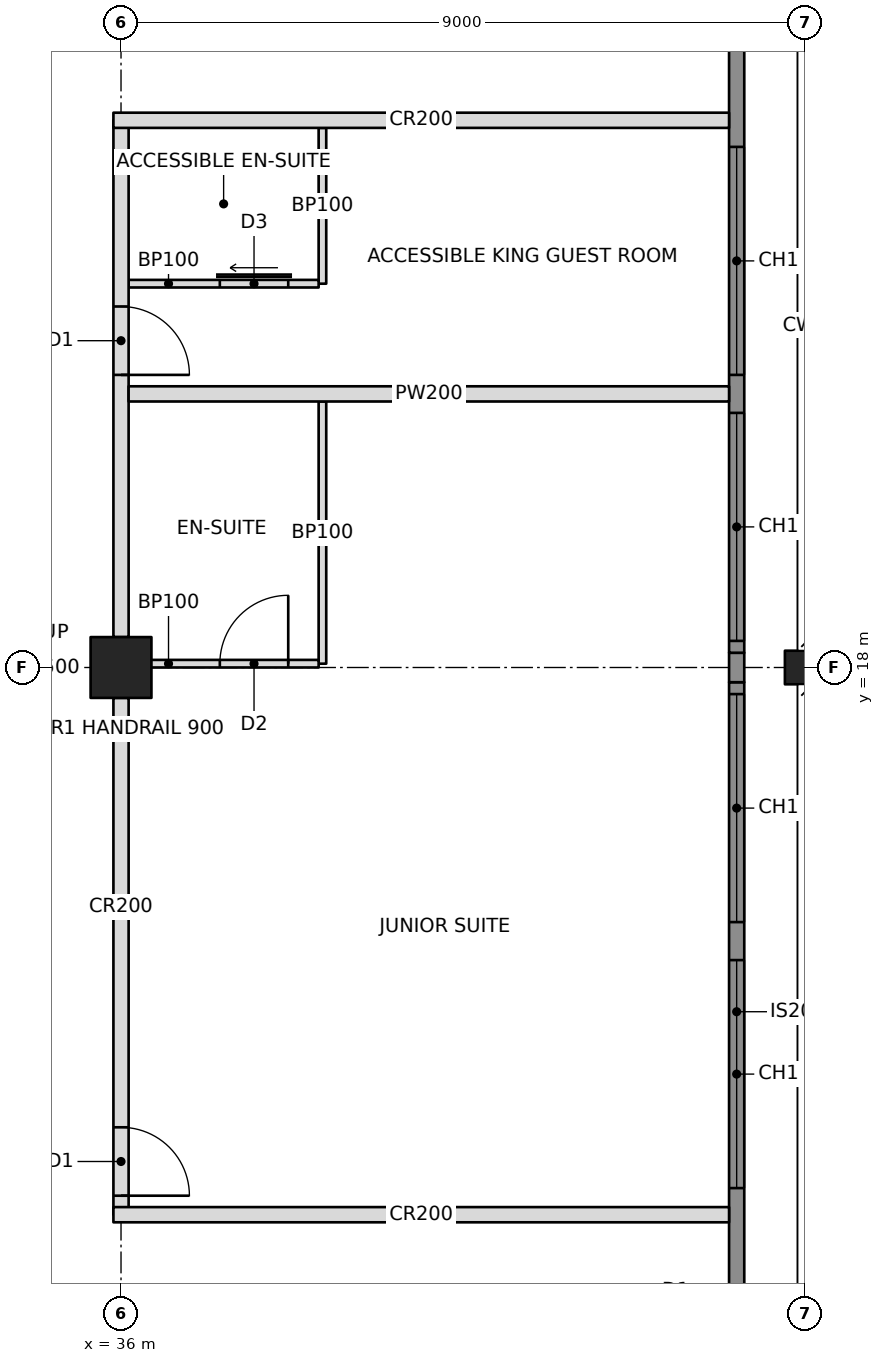
"""IFC4 building model, lengths in metres.
Left out: names, types, materials, properties, quantities, classifications, styles, units other than length and angle.
Written with IfcOpenShell. Run it as: python <this file> out.ifc"""

import sys

from ifc_helpers import new_model, si_unit, direction, frame, frame_2d, origin, origin_2d, place, context, subcontext, project, spatial, rectangle, hollow_rectangle, i_section, extrude, element, fill, save


model = new_model("IFC4")
c1 = context("Model", 3, precision=1e-05, world=origin(), true_north=direction((0.0, 1.0)))
c2 = subcontext(c1, "Body", "Model", "MODEL_VIEW")
j1 = project(units=[si_unit("LENGTHUNIT", "METRE"), si_unit("PLANEANGLEUNIT", "RADIAN")], contexts=[c1])
p1 = place(None, origin())
s1 = spatial("IfcSite", under=j1, at=p1, CompositionType="ELEMENT")
p2 = place(p1, origin())
s2 = spatial("IfcBuilding", under=s1, at=p2, CompositionType="ELEMENT")
p3 = place(p2, frame((0.0, 0.0, 148.6)))
s3 = spatial("IfcBuildingStorey", under=s2, at=p3, CompositionType="ELEMENT", Elevation=148.6)
p4 = place(p3, frame((36.0, 18.0, 0.0), z_axis=(0.0, 0.0, 1.0), x_axis=(0.0, 1.0, 0.0)))
e1 = element("IfcColumn", 1, at=p4, inside=s3, PredefinedType="COLUMN", context=c2, shape_type="SweptSolid", body=[
    extrude(hollow_rectangle(XDim=0.8, YDim=0.8, WallThickness=0.07, at=origin_2d()), origin(), (0.0, 0.0, 1.0), 3.4),
])
p5 = place(p3, frame((45.0, 18.0, 0.0), z_axis=(0.0, 0.0, 1.0), x_axis=(0.0, 1.0, 0.0)))
e2 = element("IfcColumn", 2, at=p5, inside=s3, PredefinedType="COLUMN", context=c2, shape_type="SweptSolid", body=[
    extrude(i_section(OverallWidth=0.442, OverallDepth=0.531, WebThickness=0.066, FlangeThickness=0.106, at=origin_2d()), origin(), (0.0, 0.0, 1.0), 3.4),
])
p6 = place(p3, frame((36.0, 10.8, 0.0), z_axis=(0.0, 0.0, 1.0), x_axis=(0.0, 1.0, 0.0)))
e3 = element("IfcWall", 3, at=p6, inside=s3, PredefinedType="PARTITIONING", context=c2, shape_type="SweptSolid", body=[
    extrude(rectangle(XDim=6.8, YDim=0.2, at=frame_2d((3.4, 0.0))), origin(), (0.0, 0.0, 1.0), 2.405),
])
p7 = place(p6, frame((0.25, 0.0, 0.0)))
e4 = element("IfcOpeningElement", 4, at=p7, cuts=e3, PredefinedType="OPENING", context=c2, shape_type="SweptSolid", body=[
    extrude(rectangle(XDim=0.9, YDim=2.1, at=frame_2d((0.45, 1.05))), frame((0.0, 0.11, 0.0), z_axis=(0.0, -1.0, 0.0), x_axis=(1.0, 0.0, 0.0)), (0.0, 0.0, 1.0), 0.22),
])
p8 = place(p3, frame((36.0, 18.4, 0.0), z_axis=(0.0, 0.0, 1.0), x_axis=(0.0, 1.0, 0.0)))
e5 = element("IfcWall", 5, at=p8, inside=s3, PredefinedType="PARTITIONING", context=c2, shape_type="SweptSolid", body=[
    extrude(rectangle(XDim=6.8, YDim=0.2, at=frame_2d((3.4, 0.0))), origin(), (0.0, 0.0, 1.0), 2.405),
])
p9 = place(p8, frame((3.45, 0.0, 0.0)))
e6 = element("IfcOpeningElement", 6, at=p9, cuts=e5, PredefinedType="OPENING", context=c2, shape_type="SweptSolid", body=[
    extrude(rectangle(XDim=0.9, YDim=2.1, at=frame_2d((0.45, 1.05))), frame((0.0, 0.11, 0.0), z_axis=(0.0, -1.0, 0.0), x_axis=(1.0, 0.0, 0.0)), (0.0, 0.0, 1.0), 0.22),
])
for number, where, z_axis, x_axis in (
    (7, (35.9, 10.8, 0.0), (0.0, 0.0, 1.0), (1.0, 0.0, 0.0)),
    (8, (35.9, 25.2, 0.0), (0.0, 0.0, 1.0), (1.0, 0.0, 0.0)),
):
    element("IfcWall", number, at=place(p3, frame(where, z_axis=z_axis, x_axis=x_axis)), inside=s3, PredefinedType="PARTITIONING", context=c2, shape_type="SweptSolid", body=[
        extrude(rectangle(XDim=8.1, YDim=0.2, at=frame_2d((4.05, 0.0))), origin(), (0.0, 0.0, 1.0), 2.404),
    ])
p10 = place(p3, frame((36.1, 21.6, 0.0), z_axis=(0.0, 0.0, 1.0), x_axis=(1.0, 0.0, 0.0)))
e9 = element("IfcWall", 9, at=p10, inside=s3, PredefinedType="PARTITIONING", context=c2, shape_type="SweptSolid", body=[
    extrude(rectangle(XDim=7.9, YDim=0.2, at=frame_2d((3.95, 0.0))), origin(), (0.0, 0.0, 1.0), 2.404),
])
p11 = place(p3, frame((38.65, 18.05, 0.0), z_axis=(0.0, 0.0, 1.0), x_axis=(0.0, 1.0, 0.0)))
e10 = element("IfcWall", 10, at=p11, inside=s3, PredefinedType="PARTITIONING", context=c2, shape_type="SweptSolid", body=[
    extrude(rectangle(XDim=3.45, YDim=0.1, at=frame_2d((1.725, 0.0))), origin(), (0.0, 0.0, 1.0), 2.404),
])
p12 = place(p3, frame((36.1, 18.05, 0.0), z_axis=(0.0, 0.0, 1.0), x_axis=(1.0, 0.0, 0.0)))
e11 = element("IfcWall", 11, at=p12, inside=s3, PredefinedType="PARTITIONING", context=c2, shape_type="SweptSolid", body=[
    extrude(rectangle(XDim=2.5, YDim=0.1, at=frame_2d((1.25, 0.0))), origin(), (0.0, 0.0, 1.0), 2.405),
])
p13 = place(p12, frame((1.2, 0.0, 0.0)))
e12 = element("IfcOpeningElement", 12, at=p13, cuts=e11, PredefinedType="OPENING", context=c2, shape_type="SweptSolid", body=[
    extrude(rectangle(XDim=0.9, YDim=2.1, at=frame_2d((0.45, 1.05))), frame((0.0, 0.06, 0.0), z_axis=(0.0, -1.0, 0.0), x_axis=(1.0, 0.0, 0.0)), (0.0, 0.0, 1.0), 0.12),
])
p14 = place(p3, frame((38.65, 23.05, 0.0), z_axis=(0.0, 0.0, 1.0), x_axis=(0.0, 1.0, 0.0)))
e13 = element("IfcWall", 13, at=p14, inside=s3, PredefinedType="PARTITIONING", context=c2, shape_type="SweptSolid", body=[
    extrude(rectangle(XDim=2.05, YDim=0.1, at=frame_2d((1.025, 0.0))), origin(), (0.0, 0.0, 1.0), 3.2),
])
p15 = place(p3, frame((36.1, 23.05, 0.0), z_axis=(0.0, 0.0, 1.0), x_axis=(1.0, 0.0, 0.0)))
e14 = element("IfcWall", 14, at=p15, inside=s3, PredefinedType="PARTITIONING", context=c2, shape_type="SweptSolid", body=[
    extrude(rectangle(XDim=2.5, YDim=0.1, at=frame_2d((1.25, 0.0))), origin(), (0.0, 0.0, 1.0), 2.404),
])
p16 = place(p15, frame((1.2, 0.0, 0.0)))
e15 = element("IfcOpeningElement", 15, at=p16, cuts=e14, PredefinedType="OPENING", context=c2, shape_type="SweptSolid", body=[
    extrude(rectangle(XDim=0.9, YDim=2.1, at=frame_2d((0.45, 1.05))), frame((0.0, 0.06, 0.0), z_axis=(0.0, -1.0, 0.0), x_axis=(1.0, 0.0, 0.0)), (0.0, 0.0, 1.0), 0.12),
])
p17 = place(p3, frame((44.1, 9.135, 0.0), z_axis=(0.0, 0.0, 1.0), x_axis=(0.0, 1.0, 0.0)))
e16 = element("IfcWall", 16, at=p17, inside=s3, PredefinedType="SOLIDWALL", context=c2, shape_type="SweptSolid", body=[
    extrude(rectangle(XDim=8.671, YDim=0.2, at=frame_2d((4.335, 0.0))), origin(), (0.0, 0.0, 1.0), 3.2),
])
p18 = place(p17, frame((2.015, 0.0, 0.6)))
e17 = element("IfcOpeningElement", 17, at=p18, cuts=e16, PredefinedType="OPENING", context=c2, shape_type="SweptSolid", body=[
    extrude(rectangle(XDim=3.0, YDim=2.2, at=frame_2d((1.5, 1.1))), frame((0.0, 0.11, 0.0), z_axis=(0.0, -1.0, 0.0), x_axis=(1.0, 0.0, 0.0)), (0.0, 0.0, 1.0), 0.22),
])
p19 = place(p17, frame((5.515, 0.0, 0.6)))
e18 = element("IfcOpeningElement", 18, at=p19, cuts=e16, PredefinedType="OPENING", context=c2, shape_type="SweptSolid", body=[
    extrude(rectangle(XDim=3.0, YDim=2.2, at=frame_2d((1.5, 1.1))), frame((0.0, 0.11, 0.0), z_axis=(0.0, -1.0, 0.0), x_axis=(1.0, 0.0, 0.0)), (0.0, 0.0, 1.0), 0.22),
])
p20 = place(p3, frame((44.1, 17.806, 0.0), z_axis=(0.0, 0.0, 1.0), x_axis=(0.0, 1.0, 0.0)))
e19 = element("IfcWall", 19, at=p20, inside=s3, PredefinedType="SOLIDWALL", context=c2, shape_type="SweptSolid", body=[
    extrude(rectangle(XDim=0.388, YDim=0.2, at=frame_2d((0.194, 0.0))), origin(), (0.0, 0.0, 1.0), 2.404),
])
p21 = place(p3, frame((44.1, 18.194, 0.0), z_axis=(0.0, 0.0, 1.0), x_axis=(0.0, 1.0, 0.0)))
e20 = element("IfcWall", 20, at=p21, inside=s3, PredefinedType="SOLIDWALL", context=c2, shape_type="SweptSolid", body=[
    extrude(rectangle(XDim=8.671, YDim=0.2, at=frame_2d((4.335, 0.0))), origin(), (0.0, 0.0, 1.0), 3.2),
])
p22 = place(p21, frame((0.156, 0.0, 0.6)))
e21 = element("IfcOpeningElement", 21, at=p22, cuts=e20, PredefinedType="OPENING", context=c2, shape_type="SweptSolid", body=[
    extrude(rectangle(XDim=3.0, YDim=2.2, at=frame_2d((1.5, 1.1))), frame((0.0, 0.11, 0.0), z_axis=(0.0, -1.0, 0.0), x_axis=(1.0, 0.0, 0.0)), (0.0, 0.0, 1.0), 0.22),
])
p23 = place(p21, frame((3.656, 0.0, 0.6)))
e22 = element("IfcOpeningElement", 22, at=p23, cuts=e20, PredefinedType="OPENING", context=c2, shape_type="SweptSolid", body=[
    extrude(rectangle(XDim=3.0, YDim=2.2, at=frame_2d((1.5, 1.1))), frame((0.0, 0.11, 0.0), z_axis=(0.0, -1.0, 0.0), x_axis=(1.0, 0.0, 0.0)), (0.0, 0.0, 1.0), 0.22),
])
p24 = place(p18, origin())
e23 = element("IfcWindow", 23, at=p24, inside=s3, PartitioningType="TRIPLE_PANEL_VERTICAL", PredefinedType="WINDOW", context=c2, shape_type="SweptSolid", body=[
    extrude(rectangle(XDim=3.0, YDim=2.2, at=frame_2d((1.5, 1.1))), frame((0.0, 0.03, 0.0), z_axis=(0.0, -1.0, 0.0), x_axis=(1.0, 0.0, 0.0)), (0.0, 0.0, 1.0), 0.06),
])
fill(e17, e23)
p25 = place(p19, origin())
e24 = element("IfcWindow", 24, at=p25, inside=s3, PartitioningType="TRIPLE_PANEL_VERTICAL", PredefinedType="WINDOW", context=c2, shape_type="SweptSolid", body=[
    extrude(rectangle(XDim=3.0, YDim=2.2, at=frame_2d((1.5, 1.1))), frame((0.0, 0.03, 0.0), z_axis=(0.0, -1.0, 0.0), x_axis=(1.0, 0.0, 0.0)), (0.0, 0.0, 1.0), 0.06),
])
fill(e18, e24)
p26 = place(p22, origin())
e25 = element("IfcWindow", 25, at=p26, inside=s3, PartitioningType="TRIPLE_PANEL_VERTICAL", PredefinedType="WINDOW", context=c2, shape_type="SweptSolid", body=[
    extrude(rectangle(XDim=3.0, YDim=2.2, at=frame_2d((1.5, 1.1))), frame((0.0, 0.03, 0.0), z_axis=(0.0, -1.0, 0.0), x_axis=(1.0, 0.0, 0.0)), (0.0, 0.0, 1.0), 0.06),
])
fill(e21, e25)
p27 = place(p23, origin())
e26 = element("IfcWindow", 26, at=p27, inside=s3, PartitioningType="TRIPLE_PANEL_VERTICAL", PredefinedType="WINDOW", context=c2, shape_type="SweptSolid", body=[
    extrude(rectangle(XDim=3.0, YDim=2.2, at=frame_2d((1.5, 1.1))), frame((0.0, 0.03, 0.0), z_axis=(0.0, -1.0, 0.0), x_axis=(1.0, 0.0, 0.0)), (0.0, 0.0, 1.0), 0.06),
])
fill(e22, e26)
p28 = place(p13, origin())
e27 = element("IfcDoor", 27, at=p28, inside=s3, OperationType="SINGLE_SWING_RIGHT", PredefinedType="DOOR", context=c2, shape_type="SweptSolid", body=[
    extrude(rectangle(XDim=0.9, YDim=2.1, at=frame_2d((0.45, 1.05))), frame((0.0, 0.025, 0.0), z_axis=(0.0, -1.0, 0.0), x_axis=(1.0, 0.0, 0.0)), (0.0, 0.0, 1.0), 0.05),
])
fill(e12, e27)
p29 = place(p7, frame((0.9, 0.0, 0.0), z_axis=(0.0, 0.0, 1.0), x_axis=(-1.0, 0.0, 0.0)))
e28 = element("IfcDoor", 28, at=p29, inside=s3, OperationType="SINGLE_SWING_RIGHT", PredefinedType="DOOR", context=c2, shape_type="SweptSolid", body=[
    extrude(rectangle(XDim=0.9, YDim=2.1, at=frame_2d((0.45, 1.05))), frame((0.0, 0.025, 0.0), z_axis=(0.0, -1.0, 0.0), x_axis=(1.0, 0.0, 0.0)), (0.0, 0.0, 1.0), 0.05),
])
fill(e4, e28)
p30 = place(p16, origin())
e29 = element("IfcDoor", 29, at=p30, inside=s3, OperationType="SLIDING_TO_LEFT", PredefinedType="DOOR", context=c2, shape_type="SweptSolid", body=[
    extrude(rectangle(XDim=0.9, YDim=2.1, at=frame_2d((0.45, 1.05))), frame((0.0, 0.025, 0.0), z_axis=(0.0, -1.0, 0.0), x_axis=(1.0, 0.0, 0.0)), (0.0, 0.0, 1.0), 0.05),
])
fill(e15, e29)
p31 = place(p9, frame((0.9, 0.0, 0.0), z_axis=(0.0, 0.0, 1.0), x_axis=(-1.0, 0.0, 0.0)))
e30 = element("IfcDoor", 30, at=p31, inside=s3, OperationType="SINGLE_SWING_RIGHT", PredefinedType="DOOR", context=c2, shape_type="SweptSolid", body=[
    extrude(rectangle(XDim=0.9, YDim=2.1, at=frame_2d((0.45, 1.05))), frame((0.0, 0.025, 0.0), z_axis=(0.0, -1.0, 0.0), x_axis=(1.0, 0.0, 0.0)), (0.0, 0.0, 1.0), 0.05),
])
fill(e6, e30)
save(model, sys.argv[1])
